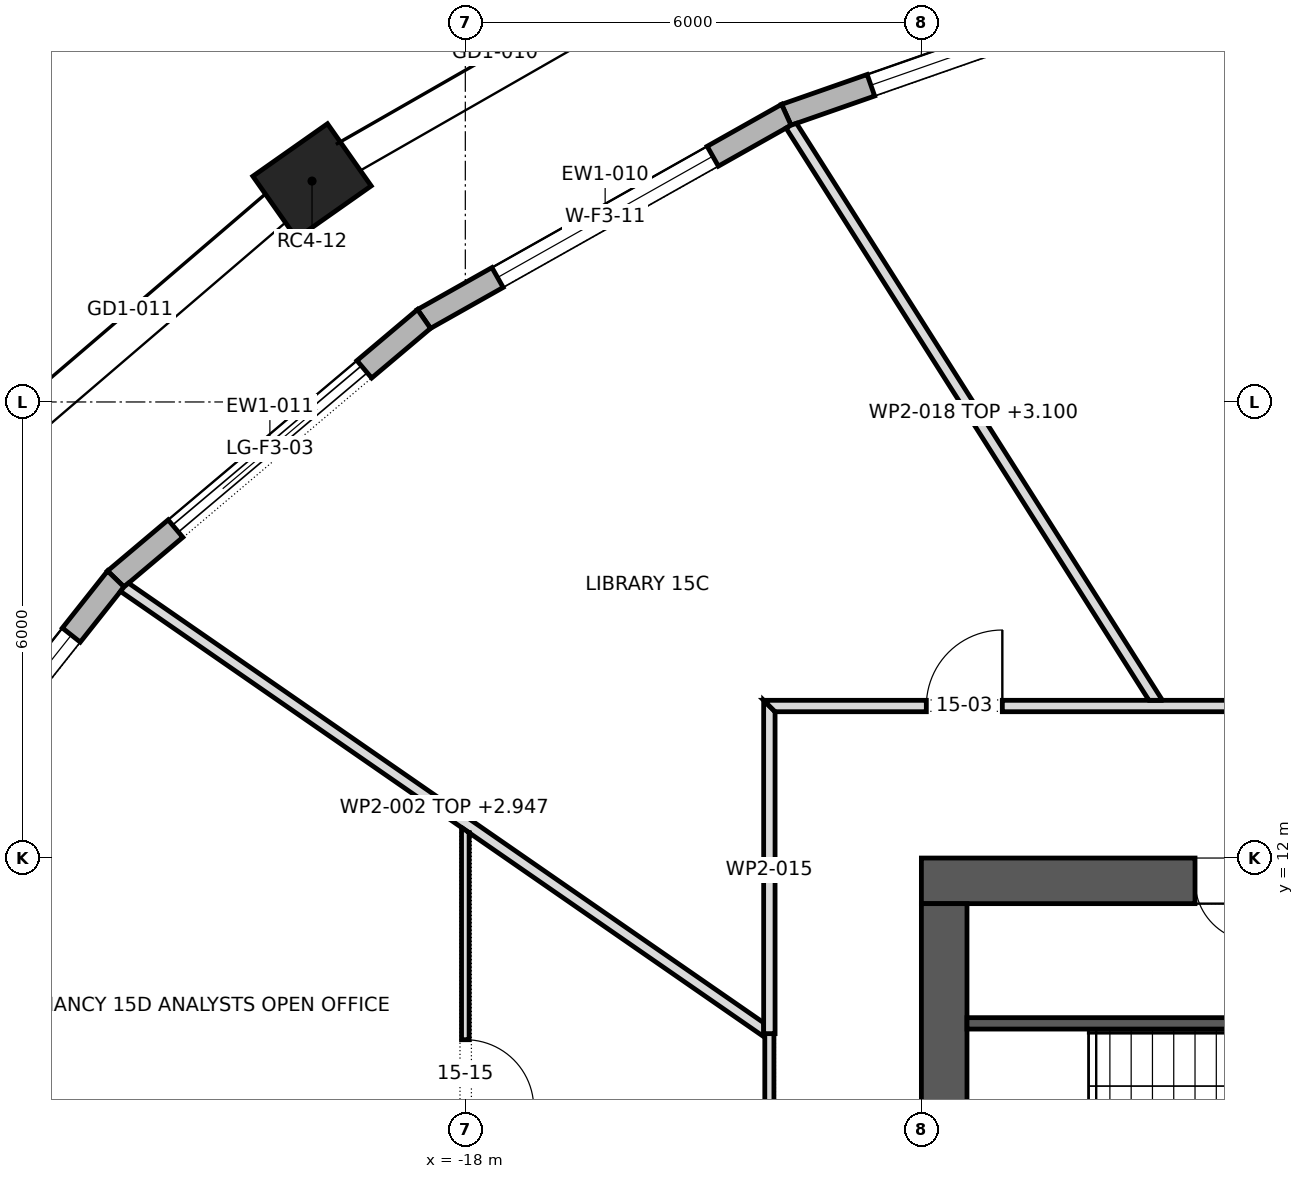
"""IFC4 building model, lengths in metres.
Left out: names, types, materials, properties, quantities, classifications, styles, units other than length and angle.
Written with IfcOpenShell. Run it as: python <this file> out.ifc"""

import sys

from ifc_helpers import new_model, si_unit, direction, frame, frame_2d, origin, origin_2d, place, context, subcontext, project, spatial, polyline, rectangle, outline, extrude, element, fill, save


model = new_model("IFC4")
c1 = context("Model", 3, precision=1e-05, world=origin(), true_north=direction((0.0, 1.0)))
c2 = subcontext(c1, "Body", "Model", "MODEL_VIEW")
j1 = project(units=[si_unit("LENGTHUNIT", "METRE"), si_unit("PLANEANGLEUNIT", "RADIAN")], contexts=[c1])
p1 = place(None, origin())
s1 = spatial("IfcSite", under=j1, at=p1, CompositionType="ELEMENT")
p2 = place(p1, origin())
s2 = spatial("IfcBuilding", under=s1, at=p2, CompositionType="ELEMENT")
p3 = place(p2, frame((0.0, 0.0, 222.9)))
s3 = spatial("IfcBuildingStorey", under=s2, at=p3, CompositionType="ELEMENT", Elevation=222.9)
p4 = place(p3, frame((-20.017, 20.906, 0.0), z_axis=(0.0, 0.0, 1.0), x_axis=(-0.817908788019, -0.57534790734, 0.0)))
e1 = element("IfcColumn", 1, at=p4, inside=s3, PredefinedType="COLUMN", context=c2, shape_type="SweptSolid", body=[
    extrude(rectangle(XDim=1.2, YDim=1.0, at=origin_2d()), origin(), (0.0, 0.0, 1.0), 4.0),
])
p5 = place(p3, frame((-12.0, 11.7, 0.0), z_axis=(0.0, 0.0, 1.0), x_axis=(1.0, 0.0, 0.0)))
e2 = element("IfcWall", 2, at=p5, inside=s3, PredefinedType="SHEAR", context=c2, shape_type="SweptSolid", body=[
    extrude(rectangle(XDim=24.0, YDim=0.6, at=frame_2d((12.0, 0.0))), origin(), (0.0, 0.0, 1.0), 4.0),
])
p6 = place(p5, frame((9.975, 0.0, 0.0)))
e3 = element("IfcOpeningElement", 3, at=p6, cuts=e2, PredefinedType="OPENING", context=c2, shape_type="SweptSolid", body=[
    extrude(rectangle(XDim=0.9, YDim=2.1, at=frame_2d((0.45, 1.05))), frame((0.0, 0.312, 0.0), z_axis=(0.0, -1.0, 0.0), x_axis=(1.0, 0.0, 0.0)), (0.0, 0.0, 1.0), 0.624),
])
p7 = place(p5, frame((3.6, 0.0, 0.0)))
e4 = element("IfcOpeningElement", 4, at=p7, cuts=e2, PredefinedType="OPENING", context=c2, shape_type="SweptSolid", body=[
    extrude(rectangle(XDim=0.8, YDim=2.1, at=frame_2d((0.4, 1.05))), frame((0.0, 0.312, 0.0), z_axis=(0.0, -1.0, 0.0), x_axis=(1.0, 0.0, 0.0)), (0.0, 0.0, 1.0), 0.624),
])
p8 = place(p5, frame((6.2, 0.0, 0.0)))
e5 = element("IfcOpeningElement", 5, at=p8, cuts=e2, PredefinedType="OPENING", context=c2, shape_type="SweptSolid", body=[
    extrude(rectangle(XDim=0.8, YDim=2.1, at=frame_2d((0.4, 1.05))), frame((0.0, 0.312, 0.0), z_axis=(0.0, -1.0, 0.0), x_axis=(1.0, 0.0, 0.0)), (0.0, 0.0, 1.0), 0.624),
])
p9 = place(p5, frame((15.85, 0.0, 0.0)))
e6 = element("IfcOpeningElement", 6, at=p9, cuts=e2, PredefinedType="OPENING", context=c2, shape_type="SweptSolid", body=[
    extrude(rectangle(XDim=0.8, YDim=2.1, at=frame_2d((0.4, 1.05))), frame((0.0, 0.312, 0.0), z_axis=(0.0, -1.0, 0.0), x_axis=(1.0, 0.0, 0.0)), (0.0, 0.0, 1.0), 0.624),
])
p10 = place(p3, frame((-11.7, -11.4, 0.0), z_axis=(0.0, 0.0, 1.0), x_axis=(0.0, 1.0, 0.0)))
e7 = element("IfcWall", 7, at=p10, inside=s3, PredefinedType="SHEAR", context=c2, shape_type="SweptSolid", body=[
    extrude(rectangle(XDim=22.8, YDim=0.6, at=frame_2d((11.4, 0.0))), origin(), (0.0, 0.0, 1.0), 4.0),
])
p11 = place(p10, frame((10.2, 0.0, 0.0)))
e8 = element("IfcOpeningElement", 8, at=p11, cuts=e7, PredefinedType="OPENING", context=c2, shape_type="SweptSolid", body=[
    extrude(rectangle(XDim=2.4, YDim=2.1, at=frame_2d((1.2, 1.05))), frame((0.0, 0.312, 0.0), z_axis=(0.0, -1.0, 0.0), x_axis=(1.0, 0.0, 0.0)), (0.0, 0.0, 1.0), 0.624),
])
p12 = place(p10, frame((18.925, 0.0, 0.0)))
e9 = element("IfcOpeningElement", 9, at=p12, cuts=e7, PredefinedType="OPENING", context=c2, shape_type="SweptSolid", body=[
    extrude(rectangle(XDim=1.2, YDim=2.1, at=frame_2d((0.6, 1.05))), frame((0.0, 0.312, 0.0), z_axis=(0.0, -1.0, 0.0), x_axis=(1.0, 0.0, 0.0)), (0.0, 0.0, 1.0), 0.624),
])
p13 = place(p10, frame((2.675, 0.0, 0.0)))
e10 = element("IfcOpeningElement", 10, at=p13, cuts=e7, PredefinedType="OPENING", context=c2, shape_type="SweptSolid", body=[
    extrude(rectangle(XDim=1.2, YDim=2.1, at=frame_2d((0.6, 1.05))), frame((0.0, 0.312, 0.0), z_axis=(0.0, -1.0, 0.0), x_axis=(1.0, 0.0, 0.0)), (0.0, 0.0, 1.0), 0.624),
])
p14 = place(p3, frame((-8.483, 23.627, 0.0), z_axis=(0.0, 0.0, 1.0), x_axis=(-0.944053670735, -0.329791853708, 0.0)))
e11 = element("IfcWall", 11, at=p14, inside=s3, PredefinedType="STANDARD", context=c2, shape_type="SweptSolid", body=[
    extrude(outline(polyline([(-0.013, -0.15), (5.621, -0.15), (5.594, 0.15), (0.013, 0.15), (-0.013, -0.15)])), origin(), (0.0, 0.0, 1.0), 3.7),
])
p15 = place(p14, frame((1.179, 0.0, 0.6)))
e12 = element("IfcOpeningElement", 12, at=p15, cuts=e11, PredefinedType="OPENING", context=c2, shape_type="SweptSolid", body=[
    extrude(rectangle(XDim=3.25, YDim=2.65, at=frame_2d((1.625, 1.325))), frame((0.0, 0.162, 0.0), z_axis=(0.0, -1.0, 0.0), x_axis=(1.0, 0.0, 0.0)), (0.0, 0.0, 1.0), 0.324),
])
p16 = place(p3, frame((-13.777, 21.778, 0.0), z_axis=(0.0, 0.0, 1.0), x_axis=(-0.871207038577, -0.490915772749, 0.0)))
e13 = element("IfcWall", 13, at=p16, inside=s3, PredefinedType="STANDARD", context=c2, shape_type="SweptSolid", body=[
    extrude(outline(polyline([(-0.013, -0.15), (5.485, -0.15), (5.457, 0.15), (0.013, 0.15), (-0.013, -0.15)])), origin(), (0.0, 0.0, 1.0), 3.7),
])
p17 = place(p16, frame((1.111, 0.0, 0.6)))
e14 = element("IfcOpeningElement", 14, at=p17, cuts=e13, PredefinedType="OPENING", context=c2, shape_type="SweptSolid", body=[
    extrude(rectangle(XDim=3.25, YDim=2.65, at=frame_2d((1.625, 1.325))), frame((0.0, 0.162, 0.0), z_axis=(0.0, -1.0, 0.0), x_axis=(1.0, 0.0, 0.0)), (0.0, 0.0, 1.0), 0.324),
])
p18 = place(p3, frame((-18.543, 19.092, 0.0), z_axis=(0.0, 0.0, 1.0), x_axis=(-0.764397795062, -0.644744919255, 0.0)))
e15 = element("IfcWall", 15, at=p18, inside=s3, PredefinedType="STANDARD", context=c2, shape_type="SweptSolid", body=[
    extrude(outline(polyline([(-0.014, -0.15), (5.32, -0.15), (5.29, 0.15), (0.014, 0.15), (-0.014, -0.15)])), origin(), (0.0, 0.0, 1.0), 3.7),
])
p19 = place(p18, frame((1.028, 0.0, 0.0)))
e16 = element("IfcOpeningElement", 16, at=p19, cuts=e15, PredefinedType="OPENING", context=c2, shape_type="SweptSolid", body=[
    extrude(rectangle(XDim=3.25, YDim=3.25, at=frame_2d((1.625, 1.625))), frame((0.0, 0.162, 0.0), z_axis=(0.0, -1.0, 0.0), x_axis=(1.0, 0.0, 0.0)), (0.0, 0.0, 1.0), 0.324),
])
p20 = place(p3, frame((-22.599, 15.672, 0.0), z_axis=(0.0, 0.0, 1.0), x_axis=(-0.621017151557, -0.783796974651, 0.0)))
e17 = element("IfcWall", 17, at=p20, inside=s3, PredefinedType="STANDARD", context=c2, shape_type="SweptSolid", body=[
    extrude(outline(polyline([(-0.015, -0.15), (5.15, -0.15), (5.118, 0.15), (0.015, 0.15), (-0.015, -0.15)])), origin(), (0.0, 0.0, 1.0), 3.7),
])
p21 = place(p20, frame((0.942, 0.0, 0.6)))
e18 = element("IfcOpeningElement", 18, at=p21, cuts=e17, PredefinedType="OPENING", context=c2, shape_type="SweptSolid", body=[
    extrude(rectangle(XDim=3.25, YDim=2.65, at=frame_2d((1.625, 1.325))), frame((0.0, 0.162, 0.0), z_axis=(0.0, -1.0, 0.0), x_axis=(1.0, 0.0, 0.0)), (0.0, 0.0, 1.0), 0.324),
])
p22 = place(p3, frame((-11.4, 9.825, 0.0), z_axis=(0.0, 0.0, 1.0), x_axis=(1.0, 0.0, 0.0)))
e19 = element("IfcWall", 19, at=p22, inside=s3, PredefinedType="SHEAR", context=c2, shape_type="SweptSolid", body=[
    extrude(rectangle(XDim=8.0, YDim=0.15, at=frame_2d((4.0, 0.0))), origin(), (0.0, 0.0, 1.0), 3.7),
])
p23 = place(p3, frame((-22.494, 15.57, 0.0), z_axis=(0.0, 0.0, 1.0), x_axis=(0.822227997751, -0.569158255421, 0.0)))
e20 = element("IfcWall", 20, at=p23, inside=s3, PredefinedType="PARTITIONING", context=c2, shape_type="SweptSolid", body=[
    extrude(outline(polyline([(0.0, -0.075), (1.858, -0.075), (3.717, -0.075), (5.575, -0.075), (5.577, -0.073), (5.578, -0.075), (7.155, -0.075), (8.732, -0.075), (10.309, -0.075), (10.309, -0.075), (10.281, -0.034), (10.269, -0.043), (10.24, -0.002), (10.24, -0.002), (10.187, 0.075), (8.493, 0.075), (6.8, 0.075), (5.106, 0.075), (3.412, 0.075), (1.719, 0.075), (0.025, 0.075), (0.004, -0.0), (0.0, -0.066), (0.0, -0.075)])), origin(), (0.0, 0.0, 1.0), 2.947),
])
p24 = place(p3, frame((-18.0, -1.418, 0.0), z_axis=(0.0, 0.0, 1.0), x_axis=(0.0, 1.0, 0.0)))
e21 = element("IfcWall", 21, at=p24, inside=s3, PredefinedType="PARTITIONING", context=c2, shape_type="SweptSolid", body=[
    extrude(outline(polyline([(0.008, -0.05), (1.813, -0.05), (3.618, -0.05), (5.423, -0.05), (7.229, -0.05), (7.229, -0.05), (7.328, -0.05), (7.328, -0.05), (8.934, -0.05), (10.54, -0.05), (12.146, -0.05), (13.751, -0.05), (13.821, 0.05), (13.821, 0.05), (11.889, 0.05), (9.957, 0.05), (8.025, 0.05), (6.093, 0.05), (6.092, 0.048), (6.085, 0.05), (4.564, 0.05), (3.042, 0.05), (1.521, 0.05), (0.0, 0.05), (0.0, 0.045), (0.008, -0.05)])), origin(), (0.0, 0.0, 1.0), 3.7),
])
p25 = place(p24, frame((10.128, 0.0, 0.0)))
e22 = element("IfcOpeningElement", 22, at=p25, cuts=e21, PredefinedType="OPENING", context=c2, shape_type="SweptSolid", body=[
    extrude(rectangle(XDim=0.9, YDim=2.1, at=frame_2d((0.45, 1.05))), frame((0.0, 0.062, 0.0), z_axis=(0.0, -1.0, 0.0), x_axis=(1.0, 0.0, 0.0)), (0.0, 0.0, 1.0), 0.124),
])
p26 = place(p3, frame((-14.0, 5.86, 0.0), z_axis=(0.0, 0.0, 1.0), x_axis=(0.0, 1.0, 0.0)))
e23 = element("IfcWall", 23, at=p26, inside=s3, PredefinedType="PARTITIONING", context=c2, shape_type="SweptSolid", body=[
    extrude(rectangle(XDim=3.83, YDim=0.12, at=frame_2d((1.915, 0.0))), origin(), (0.0, 0.0, 1.0), 3.7),
])
p27 = place(p26, frame((1.415, 0.0, 0.0)))
e24 = element("IfcOpeningElement", 24, at=p27, cuts=e23, PredefinedType="OPENING", context=c2, shape_type="SweptSolid", body=[
    extrude(rectangle(XDim=1.0, YDim=2.1, at=frame_2d((0.5, 1.05))), frame((0.0, 0.072, 0.0), z_axis=(0.0, -1.0, 0.0), x_axis=(1.0, 0.0, 0.0)), (0.0, 0.0, 1.0), 0.144),
])
p28 = place(p3, frame((-14.0, 9.69, 0.0), z_axis=(0.0, 0.0, 1.0), x_axis=(0.0, 1.0, 0.0)))
e25 = element("IfcWall", 25, at=p28, inside=s3, PredefinedType="PARTITIONING", context=c2, shape_type="SweptSolid", body=[
    extrude(outline(polyline([(0.0, -0.075), (1.412, -0.075), (2.823, -0.075), (4.235, -0.075), (4.385, 0.075), (2.923, 0.075), (1.462, 0.075), (0.0, 0.075), (0.0, -0.075)])), origin(), (0.0, 0.0, 1.0), 3.7),
])
p29 = place(p3, frame((-14.075, 14.0, 0.0), z_axis=(0.0, 0.0, 1.0), x_axis=(1.0, 0.0, 0.0)))
e26 = element("IfcWall", 26, at=p29, inside=s3, PredefinedType="PARTITIONING", context=c2, shape_type="SweptSolid", body=[
    extrude(outline(polyline([(15.705, 0.075), (13.742, 0.075), (11.779, 0.075), (9.815, 0.075), (7.853, 0.075), (5.889, 0.075), (3.926, 0.075), (1.963, 0.075), (0.0, 0.075), (0.15, -0.075), (2.094, -0.075), (4.039, -0.075), (5.983, -0.075), (7.927, -0.075), (9.872, -0.075), (11.816, -0.075), (13.76, -0.075), (15.705, -0.075), (15.705, 0.075)])), origin(), (0.0, 0.0, 1.0), 3.7),
])
p30 = place(p29, frame((9.955, 0.0, 0.0)))
e27 = element("IfcOpeningElement", 27, at=p30, cuts=e26, PredefinedType="OPENING", context=c2, shape_type="SweptSolid", body=[
    extrude(rectangle(XDim=1.0, YDim=2.1, at=frame_2d((0.5, 1.05))), frame((0.0, 0.087, 0.0), z_axis=(0.0, -1.0, 0.0), x_axis=(1.0, 0.0, 0.0)), (0.0, 0.0, 1.0), 0.174),
])
p31 = place(p29, frame((2.14, 0.0, 0.0)))
e28 = element("IfcOpeningElement", 28, at=p31, cuts=e26, PredefinedType="OPENING", context=c2, shape_type="SweptSolid", body=[
    extrude(rectangle(XDim=1.0, YDim=2.1, at=frame_2d((0.5, 1.05))), frame((0.0, 0.087, 0.0), z_axis=(0.0, -1.0, 0.0), x_axis=(1.0, 0.0, 0.0)), (0.0, 0.0, 1.0), 0.174),
])
p32 = place(p3, frame((-8.892, 14.035, 0.0), z_axis=(0.0, 0.0, 1.0), x_axis=(-0.535558051622, 0.84449841524, 0.0)))
e29 = element("IfcWall", 29, at=p32, inside=s3, PredefinedType="PARTITIONING", context=c2, shape_type="SweptSolid", body=[
    extrude(outline(polyline([(0.0, -0.075), (1.798, -0.075), (3.595, -0.075), (5.393, -0.075), (7.191, -0.075), (8.989, -0.075), (9.006, -0.0), (9.01, 0.069), (9.01, 0.075), (7.227, 0.075), (5.444, 0.075), (3.661, 0.075), (1.878, 0.075), (0.095, 0.075), (0.0, -0.075), (0.0, -0.075)])), origin(), (0.0, 0.0, 1.0), 3.1),
])
p33 = place(p15, origin())
e30 = element("IfcWindow", 30, at=p33, inside=s3, PartitioningType="TRIPLE_PANEL_VERTICAL", PredefinedType="WINDOW", context=c2, shape_type="SweptSolid", body=[
    extrude(rectangle(XDim=3.25, YDim=2.65, at=frame_2d((1.625, 1.325))), frame((0.0, 0.03, 0.0), z_axis=(0.0, -1.0, 0.0), x_axis=(1.0, 0.0, 0.0)), (0.0, 0.0, 1.0), 0.06),
])
fill(e12, e30)
p34 = place(p17, origin())
e31 = element("IfcWindow", 31, at=p34, inside=s3, PartitioningType="TRIPLE_PANEL_VERTICAL", PredefinedType="WINDOW", context=c2, shape_type="SweptSolid", body=[
    extrude(rectangle(XDim=3.25, YDim=2.65, at=frame_2d((1.625, 1.325))), frame((0.0, 0.03, 0.0), z_axis=(0.0, -1.0, 0.0), x_axis=(1.0, 0.0, 0.0)), (0.0, 0.0, 1.0), 0.06),
])
fill(e14, e31)
p35 = place(p19, origin())
e32 = element("IfcDoor", 32, at=p35, inside=s3, OperationType="DOUBLE_DOOR_SLIDING", PredefinedType="DOOR", context=c2, shape_type="SweptSolid", body=[
    extrude(rectangle(XDim=3.25, YDim=3.25, at=frame_2d((1.625, 1.625))), frame((0.0, 0.025, 0.0), z_axis=(0.0, -1.0, 0.0), x_axis=(1.0, 0.0, 0.0)), (0.0, 0.0, 1.0), 0.05),
])
fill(e16, e32)
p36 = place(p21, origin())
e33 = element("IfcWindow", 33, at=p36, inside=s3, PartitioningType="TRIPLE_PANEL_VERTICAL", PredefinedType="WINDOW", context=c2, shape_type="SweptSolid", body=[
    extrude(rectangle(XDim=3.25, YDim=2.65, at=frame_2d((1.625, 1.325))), frame((0.0, 0.03, 0.0), z_axis=(0.0, -1.0, 0.0), x_axis=(1.0, 0.0, 0.0)), (0.0, 0.0, 1.0), 0.06),
])
fill(e18, e33)
p37 = place(p7, frame((0.8, 0.0, 0.0), z_axis=(0.0, 0.0, 1.0), x_axis=(-1.0, 0.0, 0.0)))
e34 = element("IfcDoor", 34, at=p37, inside=s3, OperationType="SINGLE_SWING_RIGHT", PredefinedType="DOOR", context=c2, shape_type="SweptSolid", body=[
    extrude(rectangle(XDim=0.8, YDim=2.1, at=frame_2d((0.4, 1.05))), frame((0.0, 0.025, 0.0), z_axis=(0.0, -1.0, 0.0), x_axis=(1.0, 0.0, 0.0)), (0.0, 0.0, 1.0), 0.05),
])
fill(e4, e34)
p38 = place(p31, origin())
e35 = element("IfcDoor", 35, at=p38, inside=s3, OperationType="SINGLE_SWING_LEFT", PredefinedType="DOOR", context=c2, shape_type="SweptSolid", body=[
    extrude(rectangle(XDim=1.0, YDim=2.1, at=frame_2d((0.5, 1.05))), frame((0.0, 0.025, 0.0), z_axis=(0.0, -1.0, 0.0), x_axis=(1.0, 0.0, 0.0)), (0.0, 0.0, 1.0), 0.05),
])
fill(e28, e35)
p39 = place(p25, frame((0.9, 0.0, 0.0), z_axis=(0.0, 0.0, 1.0), x_axis=(-1.0, 0.0, 0.0)))
e36 = element("IfcDoor", 36, at=p39, inside=s3, OperationType="SINGLE_SWING_LEFT", PredefinedType="DOOR", context=c2, shape_type="SweptSolid", body=[
    extrude(rectangle(XDim=0.9, YDim=2.1, at=frame_2d((0.45, 1.05))), frame((0.0, 0.025, 0.0), z_axis=(0.0, -1.0, 0.0), x_axis=(1.0, 0.0, 0.0)), (0.0, 0.0, 1.0), 0.05),
])
fill(e22, e36)
save(model, sys.argv[1])
